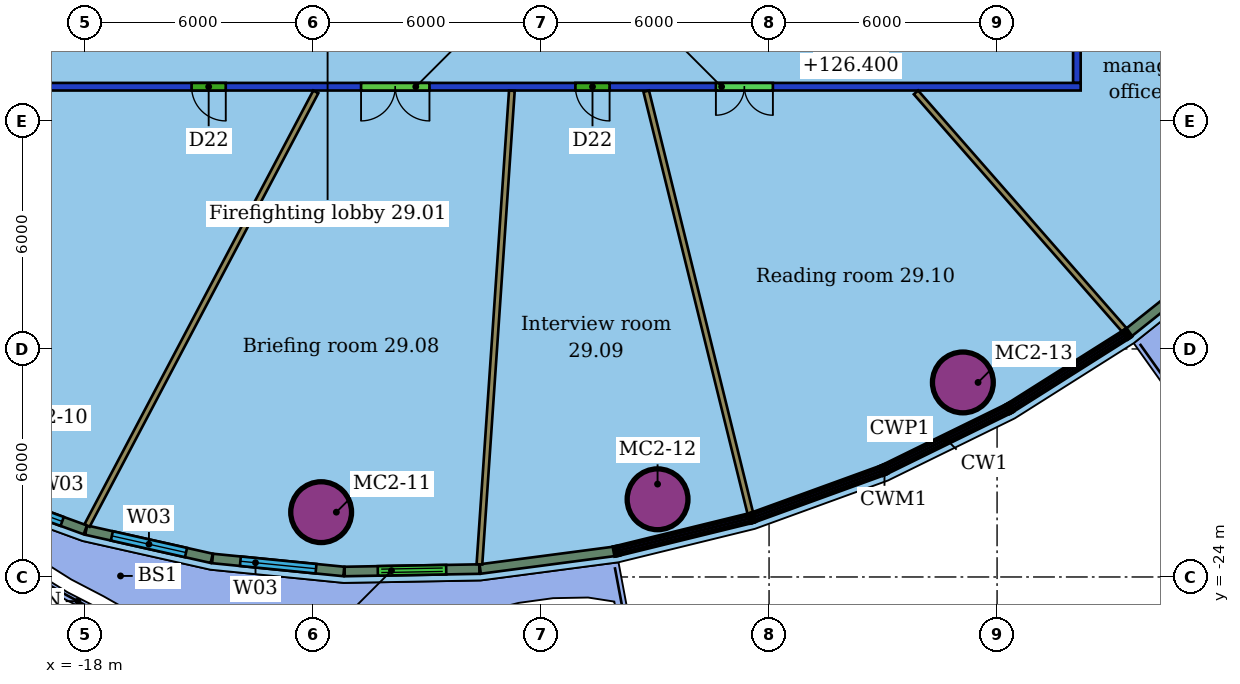
"""IFC4 building model, lengths in metres.
Left out: names, types, materials, properties, quantities, classifications, styles, units other than length and angle.
Written with IfcOpenShell. Run it as: python <this file> out.ifc"""

import sys

from ifc_helpers import new_model, si_unit, direction, frame, frame_2d, origin, origin_2d, place, context, subcontext, project, spatial, rectangle, hollow_circle, extrude, element, fill, save


model = new_model("IFC4")
c1 = context("Model", 3, precision=1e-05, world=origin(), true_north=direction((0.0, 1.0)))
c2 = subcontext(c1, "Body", "Model", "MODEL_VIEW")
j1 = project(units=[si_unit("LENGTHUNIT", "METRE"), si_unit("PLANEANGLEUNIT", "RADIAN")], contexts=[c1])
p1 = place(None, origin())
s1 = spatial("IfcSite", under=j1, at=p1, CompositionType="ELEMENT")
p2 = place(p1, origin())
s2 = spatial("IfcBuilding", under=s1, at=p2, CompositionType="ELEMENT")
p3 = place(p2, frame((0.0, 0.0, 124.6)))
s3 = spatial("IfcBuildingStorey", under=s2, at=p3, CompositionType="ELEMENT", Elevation=124.6)
for number, where, z_axis, x_axis in (
    (1, (-11.787, -22.294, 0.0), (0.0, 0.0, 1.0), (1.0, 0.0, 0.0)),
    (2, (-2.934, -21.956, 0.0), (0.0, 0.0, 1.0), (1.0, 0.0, 0.0)),
    (3, (5.1, -18.881, 0.0), (0.0, 0.0, 1.0), (1.0, 0.0, 0.0)),
):
    element("IfcColumn", number, at=place(p3, frame(where, z_axis=z_axis, x_axis=x_axis)), inside=s3, PredefinedType="COLUMN", context=c2, shape_type="SweptSolid", body=[
        extrude(hollow_circle(Radius=0.8, WallThickness=0.055, at=origin_2d()), origin(), (0.0, 0.0, 1.0), 3.45),
    ])
p4 = place(p3, frame((8.2, -11.1, 0.0), z_axis=(0.0, 0.0, 1.0), x_axis=(-1.0, 0.0, 0.0)))
e4 = element("IfcWall", 4, at=p4, inside=s3, PredefinedType="PARTITIONING", context=c2, shape_type="SweptSolid", body=[
    extrude(rectangle(XDim=28.4, YDim=0.2, at=frame_2d((14.2, 0.0))), origin(), (0.0, 0.0, 1.0), 3.0),
])
p5 = place(p4, frame((22.496, 0.0, 0.0)))
e5 = element("IfcOpeningElement", 5, at=p5, cuts=e4, PredefinedType="OPENING", context=c2, shape_type="SweptSolid", body=[
    extrude(rectangle(XDim=0.9, YDim=2.1, at=frame_2d((0.45, 1.05))), frame((0.0, 0.11, 0.0), z_axis=(0.0, -1.0, 0.0), x_axis=(1.0, 0.0, 0.0)), (0.0, 0.0, 1.0), 0.22),
])
p6 = place(p4, frame((17.136, 0.0, 0.0)))
e6 = element("IfcOpeningElement", 6, at=p6, cuts=e4, PredefinedType="OPENING", context=c2, shape_type="SweptSolid", body=[
    extrude(rectangle(XDim=1.8, YDim=2.4, at=frame_2d((0.9, 1.2))), frame((0.0, 0.11, 0.0), z_axis=(0.0, -1.0, 0.0), x_axis=(1.0, 0.0, 0.0)), (0.0, 0.0, 1.0), 0.22),
])
p7 = place(p4, frame((12.396, 0.0, 0.0)))
e7 = element("IfcOpeningElement", 7, at=p7, cuts=e4, PredefinedType="OPENING", context=c2, shape_type="SweptSolid", body=[
    extrude(rectangle(XDim=0.9, YDim=2.1, at=frame_2d((0.45, 1.05))), frame((0.0, 0.11, 0.0), z_axis=(0.0, -1.0, 0.0), x_axis=(1.0, 0.0, 0.0)), (0.0, 0.0, 1.0), 0.22),
])
p8 = place(p4, frame((8.099, 0.0, 0.0)))
e8 = element("IfcOpeningElement", 8, at=p8, cuts=e4, PredefinedType="OPENING", context=c2, shape_type="SweptSolid", body=[
    extrude(rectangle(XDim=1.5, YDim=2.1, at=frame_2d((0.75, 1.05))), frame((0.0, 0.11, 0.0), z_axis=(0.0, -1.0, 0.0), x_axis=(1.0, 0.0, 0.0)), (0.0, 0.0, 1.0), 0.22),
])
p9 = place(p3, frame((8.1, 11.0, 0.0), z_axis=(0.0, 0.0, 1.0), x_axis=(0.0, -1.0, 0.0)))
e9 = element("IfcWall", 9, at=p9, inside=s3, PredefinedType="PARTITIONING", context=c2, shape_type="SweptSolid", body=[
    extrude(rectangle(XDim=22.0, YDim=0.2, at=frame_2d((11.0, 0.0))), origin(), (0.0, 0.0, 1.0), 3.0),
])
p10 = place(p9, frame((18.584, 0.0, 0.0)))
e10 = element("IfcOpeningElement", 10, at=p10, cuts=e9, PredefinedType="OPENING", context=c2, shape_type="SweptSolid", body=[
    extrude(rectangle(XDim=1.0, YDim=2.1, at=frame_2d((0.5, 1.05))), frame((0.0, 0.11, 0.0), z_axis=(0.0, -1.0, 0.0), x_axis=(1.0, 0.0, 0.0)), (0.0, 0.0, 1.0), 0.22),
])
p11 = place(p9, frame((14.647, 0.0, 0.0)))
e11 = element("IfcOpeningElement", 11, at=p11, cuts=e9, PredefinedType="OPENING", context=c2, shape_type="SweptSolid", body=[
    extrude(rectangle(XDim=1.0, YDim=2.4, at=frame_2d((0.5, 1.2))), frame((0.0, 0.11, 0.0), z_axis=(0.0, -1.0, 0.0), x_axis=(1.0, 0.0, 0.0)), (0.0, 0.0, 1.0), 0.22),
])
p12 = place(p9, frame((8.033, 0.0, 0.0)))
e12 = element("IfcOpeningElement", 12, at=p12, cuts=e9, PredefinedType="OPENING", context=c2, shape_type="SweptSolid", body=[
    extrude(rectangle(XDim=0.9, YDim=2.1, at=frame_2d((0.45, 1.05))), frame((0.0, 0.11, 0.0), z_axis=(0.0, -1.0, 0.0), x_axis=(1.0, 0.0, 0.0)), (0.0, 0.0, 1.0), 0.22),
])
p13 = place(p3, frame((-17.946, -22.644, 0.0), z_axis=(0.0, 0.0, 1.0), x_axis=(0.466623744036, 0.884455924002, 0.0)))
e13 = element("IfcWall", 13, at=p13, inside=s3, PredefinedType="PARTITIONING", context=c2, shape_type="SweptSolid", body=[
    extrude(rectangle(XDim=12.9, YDim=0.15, at=frame_2d((6.45, 0.0))), origin(), (0.0, 0.0, 1.0), 3.45),
])
p14 = place(p3, frame((-7.622, -23.667, 0.0), z_axis=(0.0, 0.0, 1.0), x_axis=(0.068347975622, 0.997661542923, 0.0)))
e14 = element("IfcWall", 14, at=p14, inside=s3, PredefinedType="PARTITIONING", context=c2, shape_type="SweptSolid", body=[
    extrude(rectangle(XDim=12.491, YDim=0.15, at=frame_2d((6.246, 0.0))), origin(), (0.0, 0.0, 1.0), 3.45),
])
p15 = place(p3, frame((-0.492, -22.326, 0.0), z_axis=(0.0, 0.0, 1.0), x_axis=(-0.239516767383, 0.970892227872, 0.0)))
e15 = element("IfcWall", 15, at=p15, inside=s3, PredefinedType="PARTITIONING", context=c2, shape_type="SweptSolid", body=[
    extrude(rectangle(XDim=11.441, YDim=0.15, at=frame_2d((5.72, 0.0))), origin(), (0.0, 0.0, 1.0), 3.45),
])
p16 = place(p3, frame((9.349, -17.501, 0.0), z_axis=(0.0, 0.0, 1.0), x_axis=(-0.659368828272, 0.751819624845, 0.0)))
e16 = element("IfcWall", 16, at=p16, inside=s3, PredefinedType="PARTITIONING", context=c2, shape_type="SweptSolid", body=[
    extrude(rectangle(XDim=8.316, YDim=0.15, at=frame_2d((4.158, 0.0))), origin(), (0.0, 0.0, 1.0), 3.45),
])
p17 = place(p3, frame((-21.089, -21.632, 0.0), z_axis=(0.0, 0.0, 1.0), x_axis=(0.939579104827, -0.342331864969, 0.0)))
e17 = element("IfcWall", 17, at=p17, inside=s3, PredefinedType="SOLIDWALL", context=c2, shape_type="SweptSolid", body=[
    extrude(rectangle(XDim=3.296, YDim=0.25, at=frame_2d((1.648, 0.0))), origin(), (0.0, 0.0, 1.0), 3.05),
])
p18 = place(p17, frame((0.648, 0.0, 0.9)))
e18 = element("IfcOpeningElement", 18, at=p18, cuts=e17, PredefinedType="OPENING", context=c2, shape_type="SweptSolid", body=[
    extrude(rectangle(XDim=2.0, YDim=2.1, at=frame_2d((1.0, 1.05))), frame((0.0, 0.135, 0.0), z_axis=(0.0, -1.0, 0.0), x_axis=(1.0, 0.0, 0.0)), (0.0, 0.0, 1.0), 0.27),
])
p19 = place(p3, frame((-17.969, -22.767, 0.0), z_axis=(0.0, 0.0, 1.0), x_axis=(0.975690768568, -0.219151828949, 0.0)))
e19 = element("IfcWall", 19, at=p19, inside=s3, PredefinedType="SOLIDWALL", context=c2, shape_type="SweptSolid", body=[
    extrude(rectangle(XDim=3.385, YDim=0.25, at=frame_2d((1.693, 0.0))), origin(), (0.0, 0.0, 1.0), 3.05),
])
p20 = place(p19, frame((0.693, 0.0, 0.9)))
e20 = element("IfcOpeningElement", 20, at=p20, cuts=e19, PredefinedType="OPENING", context=c2, shape_type="SweptSolid", body=[
    extrude(rectangle(XDim=2.0, YDim=2.1, at=frame_2d((1.0, 1.05))), frame((0.0, 0.135, 0.0), z_axis=(0.0, -1.0, 0.0), x_axis=(1.0, 0.0, 0.0)), (0.0, 0.0, 1.0), 0.27),
])
p21 = place(p3, frame((-14.643, -23.513, 0.0), z_axis=(0.0, 0.0, 1.0), x_axis=(0.995116970578, -0.09870265887, 0.0)))
e21 = element("IfcWall", 21, at=p21, inside=s3, PredefinedType="SOLIDWALL", context=c2, shape_type="SweptSolid", body=[
    extrude(rectangle(XDim=3.47, YDim=0.25, at=frame_2d((1.735, 0.0))), origin(), (0.0, 0.0, 1.0), 3.05),
])
p22 = place(p21, frame((0.735, 0.0, 0.9)))
e22 = element("IfcOpeningElement", 22, at=p22, cuts=e21, PredefinedType="OPENING", context=c2, shape_type="SweptSolid", body=[
    extrude(rectangle(XDim=2.0, YDim=2.1, at=frame_2d((1.0, 1.05))), frame((0.0, 0.135, 0.0), z_axis=(0.0, -1.0, 0.0), x_axis=(1.0, 0.0, 0.0)), (0.0, 0.0, 1.0), 0.27),
])
p23 = place(p3, frame((-11.167, -23.856, 0.0), z_axis=(0.0, 0.0, 1.0), x_axis=(0.999835910543, 0.018114965863, 0.0)))
e23 = element("IfcWall", 23, at=p23, inside=s3, PredefinedType="SOLIDWALL", context=c2, shape_type="SweptSolid", body=[
    extrude(rectangle(XDim=3.544, YDim=0.25, at=frame_2d((1.772, 0.0))), origin(), (0.0, 0.0, 1.0), 3.05),
])
p24 = place(p23, frame((0.872, 0.0, 0.0)))
e24 = element("IfcOpeningElement", 24, at=p24, cuts=e23, PredefinedType="OPENING", context=c2, shape_type="SweptSolid", body=[
    extrude(rectangle(XDim=1.8, YDim=2.4, at=frame_2d((0.9, 1.2))), frame((0.0, 0.135, 0.0), z_axis=(0.0, -1.0, 0.0), x_axis=(1.0, 0.0, 0.0)), (0.0, 0.0, 1.0), 0.27),
])
p25 = place(p3, frame((-7.601, -23.79, 0.0), z_axis=(0.0, 0.0, 1.0), x_axis=(0.991455229273, 0.130447416026, 0.0)))
e25 = element("IfcWall", 25, at=p25, inside=s3, PredefinedType="SOLIDWALL", context=c2, shape_type="SweptSolid", body=[
    extrude(rectangle(XDim=3.56, YDim=0.25, at=frame_2d((1.78, 0.0))), origin(), (0.0, 0.0, 1.0), 3.05),
])
p26 = place(p3, frame((9.465, -17.569, 0.0), z_axis=(0.0, 0.0, 1.0), x_axis=(0.781691181116, 0.623665693594, 0.0)))
e26 = element("IfcWall", 26, at=p26, inside=s3, PredefinedType="SOLIDWALL", context=c2, shape_type="SweptSolid", body=[
    extrude(rectangle(XDim=3.56, YDim=0.25, at=frame_2d((1.78, 0.0))), origin(), (0.0, 0.0, 1.0), 3.05),
])
p27 = place(p5, origin())
e27 = element("IfcDoor", 27, at=p27, inside=s3, OperationType="SINGLE_SWING_LEFT", PredefinedType="DOOR", context=c2, shape_type="SweptSolid", body=[
    extrude(rectangle(XDim=0.9, YDim=2.1, at=frame_2d((0.45, 1.05))), frame((0.0, 0.025, 0.0), z_axis=(0.0, -1.0, 0.0), x_axis=(1.0, 0.0, 0.0)), (0.0, 0.0, 1.0), 0.05),
])
fill(e5, e27)
p28 = place(p6, origin())
e28 = element("IfcDoor", 28, at=p28, inside=s3, OperationType="DOUBLE_DOOR_SINGLE_SWING", PredefinedType="DOOR", context=c2, shape_type="SweptSolid", body=[
    extrude(rectangle(XDim=1.8, YDim=2.4, at=frame_2d((0.9, 1.2))), frame((0.0, 0.025, 0.0), z_axis=(0.0, -1.0, 0.0), x_axis=(1.0, 0.0, 0.0)), (0.0, 0.0, 1.0), 0.05),
])
fill(e6, e28)
p29 = place(p7, origin())
e29 = element("IfcDoor", 29, at=p29, inside=s3, OperationType="SINGLE_SWING_LEFT", PredefinedType="DOOR", context=c2, shape_type="SweptSolid", body=[
    extrude(rectangle(XDim=0.9, YDim=2.1, at=frame_2d((0.45, 1.05))), frame((0.0, 0.025, 0.0), z_axis=(0.0, -1.0, 0.0), x_axis=(1.0, 0.0, 0.0)), (0.0, 0.0, 1.0), 0.05),
])
fill(e7, e29)
p30 = place(p8, origin())
e30 = element("IfcDoor", 30, at=p30, inside=s3, OperationType="DOUBLE_DOOR_SINGLE_SWING", PredefinedType="DOOR", context=c2, shape_type="SweptSolid", body=[
    extrude(rectangle(XDim=1.5, YDim=2.1, at=frame_2d((0.75, 1.05))), frame((0.0, 0.025, 0.0), z_axis=(0.0, -1.0, 0.0), x_axis=(1.0, 0.0, 0.0)), (0.0, 0.0, 1.0), 0.05),
])
fill(e8, e30)
p31 = place(p18, origin())
e31 = element("IfcWindow", 31, at=p31, inside=s3, PartitioningType="SINGLE_PANEL", PredefinedType="WINDOW", context=c2, shape_type="SweptSolid", body=[
    extrude(rectangle(XDim=2.0, YDim=2.1, at=frame_2d((1.0, 1.05))), frame((0.0, 0.03, 0.0), z_axis=(0.0, -1.0, 0.0), x_axis=(1.0, 0.0, 0.0)), (0.0, 0.0, 1.0), 0.06),
])
fill(e18, e31)
p32 = place(p20, origin())
e32 = element("IfcWindow", 32, at=p32, inside=s3, PartitioningType="SINGLE_PANEL", PredefinedType="WINDOW", context=c2, shape_type="SweptSolid", body=[
    extrude(rectangle(XDim=2.0, YDim=2.1, at=frame_2d((1.0, 1.05))), frame((0.0, 0.03, 0.0), z_axis=(0.0, -1.0, 0.0), x_axis=(1.0, 0.0, 0.0)), (0.0, 0.0, 1.0), 0.06),
])
fill(e20, e32)
p33 = place(p22, origin())
e33 = element("IfcWindow", 33, at=p33, inside=s3, PartitioningType="SINGLE_PANEL", PredefinedType="WINDOW", context=c2, shape_type="SweptSolid", body=[
    extrude(rectangle(XDim=2.0, YDim=2.1, at=frame_2d((1.0, 1.05))), frame((0.0, 0.03, 0.0), z_axis=(0.0, -1.0, 0.0), x_axis=(1.0, 0.0, 0.0)), (0.0, 0.0, 1.0), 0.06),
])
fill(e22, e33)
p34 = place(p24, origin())
e34 = element("IfcDoor", 34, at=p34, inside=s3, OperationType="DOUBLE_DOOR_SLIDING", PredefinedType="DOOR", context=c2, shape_type="SweptSolid", body=[
    extrude(rectangle(XDim=1.8, YDim=2.4, at=frame_2d((0.9, 1.2))), frame((0.0, 0.025, 0.0), z_axis=(0.0, -1.0, 0.0), x_axis=(1.0, 0.0, 0.0)), (0.0, 0.0, 1.0), 0.05),
])
fill(e24, e34)
save(model, sys.argv[1])
